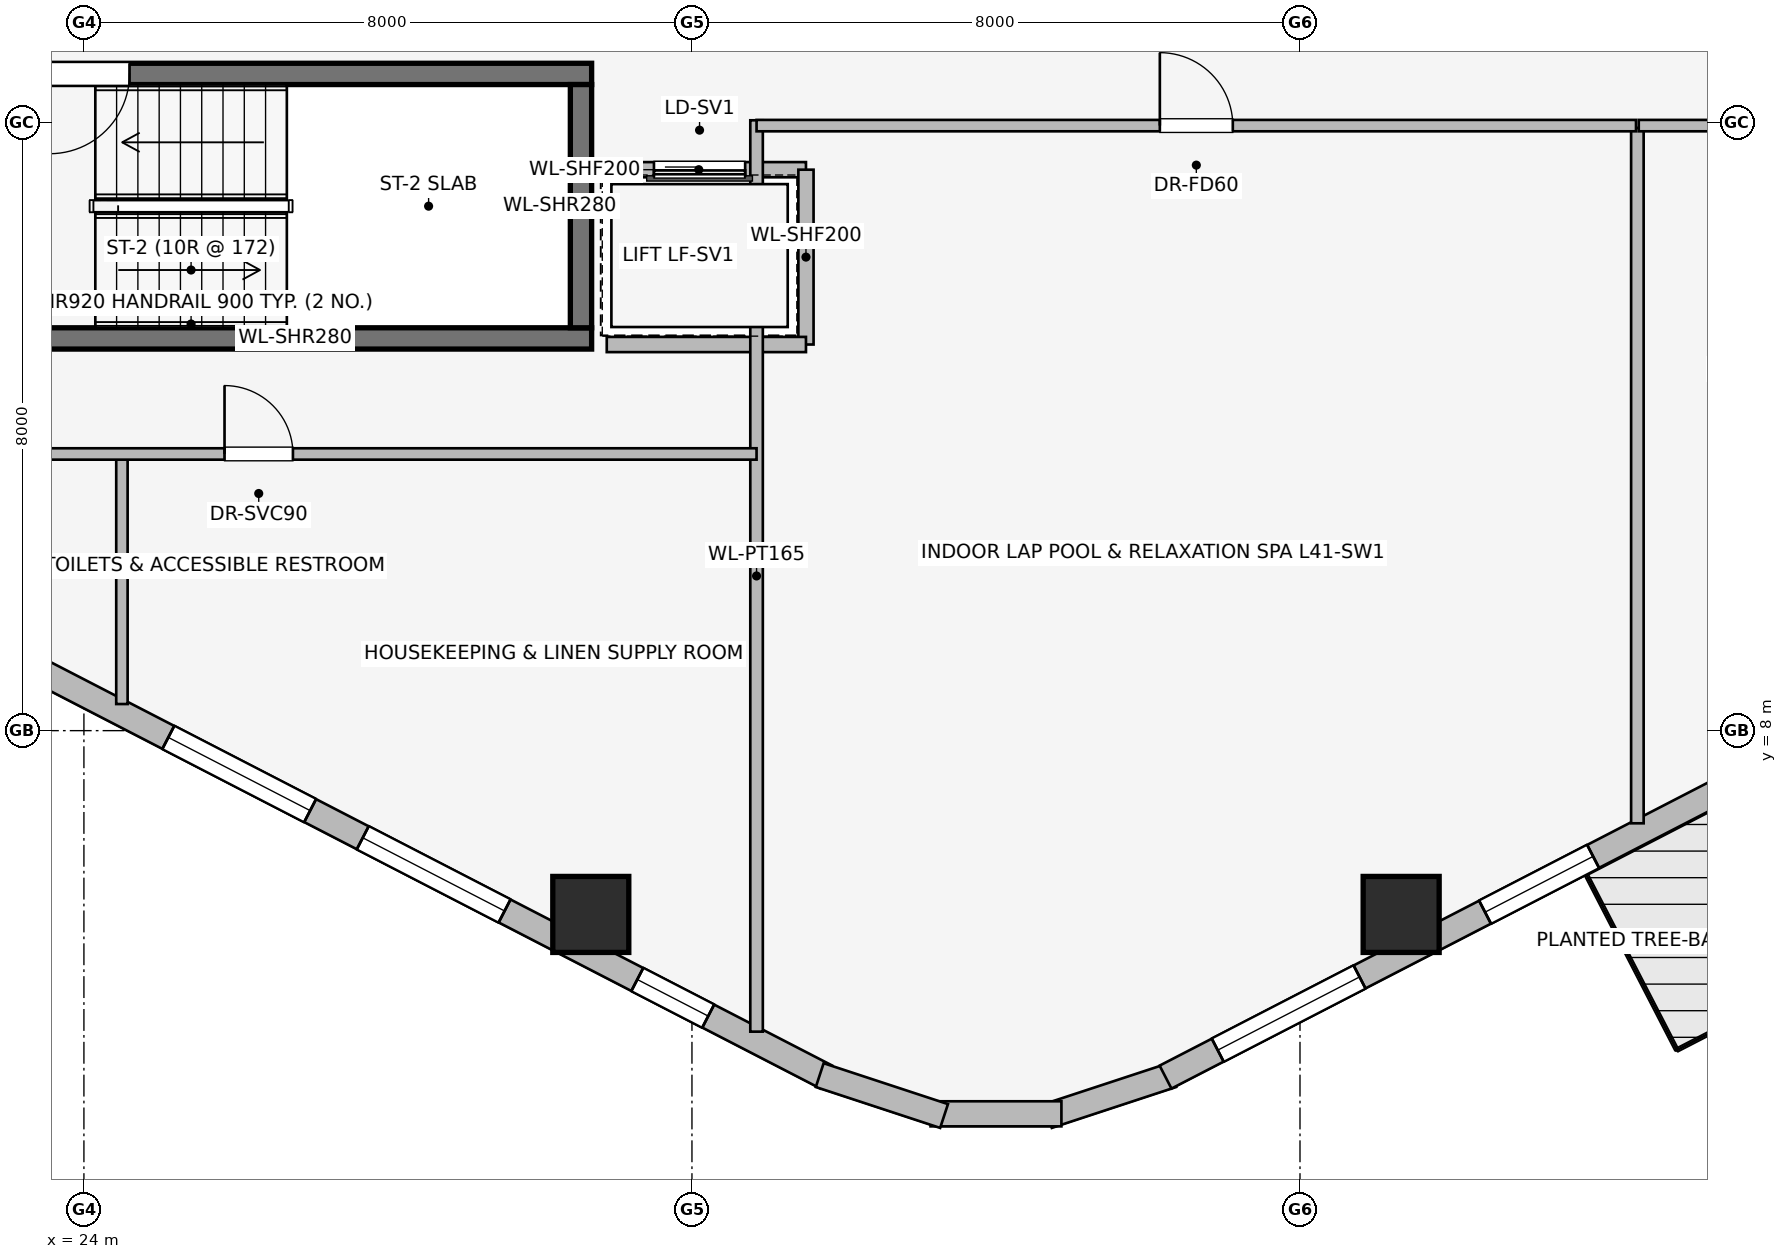
"""IFC4 building model, lengths in metres.
Left out: names, types, materials, properties, quantities, classifications, styles, units other than length and angle.
Written with IfcOpenShell. Run it as: python <this file> out.ifc"""

import sys

from ifc_helpers import new_model, si_unit, direction, frame, frame_2d, origin, origin_2d, place, context, subcontext, project, spatial, rectangle, extrude, element, fill, save


model = new_model("IFC4")
c1 = context("Model", 3, precision=1e-05, world=origin(), true_north=direction((0.0, 1.0)))
c2 = subcontext(c1, "Body", "Model", "MODEL_VIEW")
j1 = project(units=[si_unit("LENGTHUNIT", "METRE"), si_unit("PLANEANGLEUNIT", "RADIAN")], contexts=[c1])
p1 = place(None, origin())
s1 = spatial("IfcSite", under=j1, at=p1, CompositionType="ELEMENT")
p2 = place(p1, origin())
s2 = spatial("IfcBuilding", under=s1, at=p2, CompositionType="ELEMENT")
p3 = place(p2, frame((0.0, 0.0, 153.3)))
s3 = spatial("IfcBuildingStorey", under=s2, at=p3, CompositionType="ELEMENT", Elevation=153.3)
p4 = place(p3, frame((22.32, 13.16, 0.0), z_axis=(0.0, 0.0, 1.0), x_axis=(1.0, 0.0, 0.0)))
e1 = element("IfcWall", 1, at=p4, inside=s3, PredefinedType="SHEAR", context=c2, shape_type="SweptSolid", body=[
    extrude(rectangle(XDim=8.36, YDim=0.28, at=frame_2d((4.18, 0.0))), origin(), (0.0, 0.0, 1.0), 3.45),
])
p5 = place(p3, frame((30.68, 16.64, 0.0), z_axis=(0.0, 0.0, 1.0), x_axis=(-1.0, 0.0, 0.0)))
e2 = element("IfcWall", 2, at=p5, inside=s3, PredefinedType="SHEAR", context=c2, shape_type="SweptSolid", body=[
    extrude(rectangle(XDim=8.36, YDim=0.28, at=frame_2d((4.18, 0.0))), origin(), (0.0, 0.0, 1.0), 3.45),
])
p6 = place(p5, frame((6.08, 0.0, 0.0)))
e3 = element("IfcOpeningElement", 3, at=p6, cuts=e2, PredefinedType="OPENING", context=c2, shape_type="SweptSolid", body=[
    extrude(rectangle(XDim=1.05, YDim=2.0, at=frame_2d((0.525, 1.0))), frame((0.0, 0.15, 0.0), z_axis=(0.0, -1.0, 0.0), x_axis=(1.0, 0.0, 0.0)), (0.0, 0.0, 1.0), 0.3),
])
p7 = place(p3, frame((30.54, 13.3, 0.0), z_axis=(0.0, 0.0, 1.0), x_axis=(0.0, 1.0, 0.0)))
e4 = element("IfcWall", 4, at=p7, inside=s3, PredefinedType="SHEAR", context=c2, shape_type="SweptSolid", body=[
    extrude(rectangle(XDim=3.2, YDim=0.28, at=frame_2d((1.6, 0.0))), origin(), (0.0, 0.0, 1.0), 3.45),
])
for number, where, z_axis, x_axis in (
    (5, (30.669, 5.582, 0.0), (0.0, 0.0, 1.0), (1.0, 0.0, 0.0)),
    (6, (41.331, 5.582, 0.0), (0.0, 0.0, 1.0), (1.0, 0.0, 0.0)),
):
    element("IfcColumn", number, at=place(p3, frame(where, z_axis=z_axis, x_axis=x_axis)), inside=s3, PredefinedType="COLUMN", context=c2, shape_type="SweptSolid", body=[
        extrude(rectangle(XDim=1.0, YDim=1.0, at=origin_2d()), origin(), (0.0, 0.0, 1.0), 3.45),
    ])
p8 = place(p3, frame((33.769, 3.442, 0.0), z_axis=(0.0, 0.0, 1.0), x_axis=(-0.888613612362, 0.458656568606, 0.0)))
e7 = element("IfcWall", 7, at=p8, inside=s3, PredefinedType="STANDARD", context=c2, shape_type="SweptSolid", body=[
    extrude(rectangle(XDim=18.681, YDim=0.34, at=frame_2d((9.34, 0.0))), origin(), (0.0, 0.0, 1.0), 3.19),
])
p9 = place(p8, frame((1.75, 0.0, 0.75)))
e8 = element("IfcOpeningElement", 8, at=p9, cuts=e7, PredefinedType="OPENING", context=c2, shape_type="SweptSolid", body=[
    extrude(rectangle(XDim=1.05, YDim=1.4, at=frame_2d((0.525, 0.7))), frame((0.0, 0.18, 0.0), z_axis=(0.0, -1.0, 0.0), x_axis=(1.0, 0.0, 0.0)), (0.0, 0.0, 1.0), 0.36),
])
p10 = place(p8, frame((4.765, 0.0, 0.75)))
e9 = element("IfcOpeningElement", 9, at=p10, cuts=e7, PredefinedType="OPENING", context=c2, shape_type="SweptSolid", body=[
    extrude(rectangle(XDim=2.1, YDim=1.5, at=frame_2d((1.05, 0.75))), frame((0.0, 0.18, 0.0), z_axis=(0.0, -1.0, 0.0), x_axis=(1.0, 0.0, 0.0)), (0.0, 0.0, 1.0), 0.36),
])
p11 = place(p8, frame((7.644, 0.0, 0.75)))
e10 = element("IfcOpeningElement", 10, at=p11, cuts=e7, PredefinedType="OPENING", context=c2, shape_type="SweptSolid", body=[
    extrude(rectangle(XDim=2.1, YDim=1.5, at=frame_2d((1.05, 0.75))), frame((0.0, 0.18, 0.0), z_axis=(0.0, -1.0, 0.0), x_axis=(1.0, 0.0, 0.0)), (0.0, 0.0, 1.0), 0.36),
])
p12 = place(p8, frame((11.774, 0.0, 0.75)))
e11 = element("IfcOpeningElement", 11, at=p12, cuts=e7, PredefinedType="OPENING", context=c2, shape_type="SweptSolid", body=[
    extrude(rectangle(XDim=1.6, YDim=1.55, at=frame_2d((0.8, 0.775))), frame((0.0, 0.18, 0.0), z_axis=(0.0, -1.0, 0.0), x_axis=(1.0, 0.0, 0.0)), (0.0, 0.0, 1.0), 0.36),
])
p13 = place(p8, frame((15.92, 0.0, 0.75)))
e12 = element("IfcOpeningElement", 12, at=p13, cuts=e7, PredefinedType="OPENING", context=c2, shape_type="SweptSolid", body=[
    extrude(rectangle(XDim=1.05, YDim=1.4, at=frame_2d((0.525, 0.7))), frame((0.0, 0.18, 0.0), z_axis=(0.0, -1.0, 0.0), x_axis=(1.0, 0.0, 0.0)), (0.0, 0.0, 1.0), 0.36),
])
for number, where, z_axis, x_axis in (
    (13, (38.319, 3.468, 0.0), (0.0, 0.0, 1.0), (-0.95, -0.312, 0.0)),
    (14, (36.861, 2.959, 0.0), (0.0, 0.0, 1.0), (-1.0, 0.0, 0.0)),
    (15, (35.317, 2.93, 0.0), (0.0, 0.0, 1.0), (-0.95, 0.312, 0.0)),
):
    element("IfcWall", number, at=place(p3, frame(where, z_axis=z_axis, x_axis=x_axis)), inside=s3, PredefinedType="STANDARD", context=c2, shape_type="SweptSolid", body=[
        extrude(rectangle(XDim=1.722, YDim=0.33, at=frame_2d((0.861, 0.0))), origin(), (0.0, 0.0, 1.0), 3.19),
    ])
p14 = place(p3, frame((54.831, 12.01, 0.0), z_axis=(0.0, 0.0, 1.0), x_axis=(-0.888613612362, -0.458656568606, 0.0)))
e16 = element("IfcWall", 16, at=p14, inside=s3, PredefinedType="STANDARD", context=c2, shape_type="SweptSolid", body=[
    extrude(rectangle(XDim=18.681, YDim=0.34, at=frame_2d((9.34, 0.0))), origin(), (0.0, 0.0, 1.0), 3.19),
])
p15 = place(p14, frame((8.79, 0.0, 0.0)))
e17 = element("IfcOpeningElement", 17, at=p15, cuts=e16, PredefinedType="OPENING", context=c2, shape_type="SweptSolid", body=[
    extrude(rectangle(XDim=1.1, YDim=2.04, at=frame_2d((0.55, 1.02))), frame((0.0, 0.18, 0.0), z_axis=(0.0, -1.0, 0.0), x_axis=(1.0, 0.0, 0.0)), (0.0, 0.0, 1.0), 0.36),
])
p16 = place(p14, frame((1.023, 0.0, 0.75)))
e18 = element("IfcOpeningElement", 18, at=p16, cuts=e16, PredefinedType="OPENING", context=c2, shape_type="SweptSolid", body=[
    extrude(rectangle(XDim=1.6, YDim=1.55, at=frame_2d((0.8, 0.775))), frame((0.0, 0.18, 0.0), z_axis=(0.0, -1.0, 0.0), x_axis=(1.0, 0.0, 0.0)), (0.0, 0.0, 1.0), 0.36),
])
p17 = place(p14, frame((5.373, 0.0, 0.75)))
e19 = element("IfcOpeningElement", 19, at=p17, cuts=e16, PredefinedType="OPENING", context=c2, shape_type="SweptSolid", body=[
    extrude(rectangle(XDim=2.1, YDim=1.5, at=frame_2d((1.05, 0.75))), frame((0.0, 0.18, 0.0), z_axis=(0.0, -1.0, 0.0), x_axis=(1.0, 0.0, 0.0)), (0.0, 0.0, 1.0), 0.36),
])
p18 = place(p14, frame((12.35, 0.0, 0.75)))
e20 = element("IfcOpeningElement", 20, at=p18, cuts=e16, PredefinedType="OPENING", context=c2, shape_type="SweptSolid", body=[
    extrude(rectangle(XDim=1.6, YDim=1.55, at=frame_2d((0.8, 0.775))), frame((0.0, 0.18, 0.0), z_axis=(0.0, -1.0, 0.0), x_axis=(1.0, 0.0, 0.0)), (0.0, 0.0, 1.0), 0.36),
])
p19 = place(p14, frame((15.808, 0.0, 0.75)))
e21 = element("IfcOpeningElement", 21, at=p19, cuts=e16, PredefinedType="OPENING", context=c2, shape_type="SweptSolid", body=[
    extrude(rectangle(XDim=2.1, YDim=1.5, at=frame_2d((1.05, 0.75))), frame((0.0, 0.18, 0.0), z_axis=(0.0, -1.0, 0.0), x_axis=(1.0, 0.0, 0.0)), (0.0, 0.0, 1.0), 0.36),
])
p20 = place(p3, frame((33.5, 15.38, 0.0), z_axis=(0.0, 0.0, 1.0), x_axis=(-1.0, 0.0, 0.0)))
e22 = element("IfcWall", 22, at=p20, inside=s3, PredefinedType="PARTITIONING", context=c2, shape_type="SweptSolid", body=[
    extrude(rectangle(XDim=2.82, YDim=0.2, at=frame_2d((1.41, 0.0))), origin(), (0.0, 0.0, 1.0), 3.19),
])
p21 = place(p20, frame((0.8, 0.0, 0.0)))
e23 = element("IfcOpeningElement", 23, at=p21, cuts=e22, PredefinedType="OPENING", context=c2, shape_type="SweptSolid", body=[
    extrude(rectangle(XDim=1.2, YDim=2.2, at=frame_2d((0.6, 1.1))), frame((0.0, 0.11, 0.0), z_axis=(0.0, -1.0, 0.0), x_axis=(1.0, 0.0, 0.0)), (0.0, 0.0, 1.0), 0.22),
])
p22 = place(p3, frame((33.5, 13.08, 0.0), z_axis=(0.0, 0.0, 1.0), x_axis=(0.0, 1.0, 0.0)))
e24 = element("IfcWall", 24, at=p22, inside=s3, PredefinedType="PARTITIONING", context=c2, shape_type="SweptSolid", body=[
    extrude(rectangle(XDim=2.3, YDim=0.2, at=frame_2d((1.15, 0.0))), origin(), (0.0, 0.0, 1.0), 3.19),
])
p23 = place(p3, frame((30.879, 13.08, 0.0), z_axis=(0.0, 0.0, 1.0), x_axis=(1.0, 0.0, 0.0)))
e25 = element("IfcWall", 25, at=p23, inside=s3, PredefinedType="PARTITIONING", context=c2, shape_type="SweptSolid", body=[
    extrude(rectangle(XDim=2.621, YDim=0.2, at=frame_2d((1.311, 0.0))), origin(), (0.0, 0.0, 1.0), 3.19),
])
p24 = place(p3, frame((32.85, 4.04, 0.0), z_axis=(0.0, 0.0, 1.0), x_axis=(0.0, 1.0, 0.0)))
e26 = element("IfcWall", 26, at=p24, inside=s3, PredefinedType="PARTITIONING", context=c2, shape_type="SweptSolid", body=[
    extrude(rectangle(XDim=11.99, YDim=0.165, at=frame_2d((5.995, 0.0))), origin(), (0.0, 0.0, 1.0), 3.19),
])
p25 = place(p3, frame((24.5, 8.35, 0.0), z_axis=(0.0, 0.0, 1.0), x_axis=(0.0, 1.0, 0.0)))
e27 = element("IfcWall", 27, at=p25, inside=s3, PredefinedType="PARTITIONING", context=c2, shape_type="SweptSolid", body=[
    extrude(rectangle(XDim=3.29, YDim=0.15, at=frame_2d((1.645, 0.0))), origin(), (0.0, 0.0, 1.0), 3.19),
])
p26 = place(p3, frame((18.126, 11.64, 0.0), z_axis=(0.0, 0.0, 1.0), x_axis=(1.0, 0.0, 0.0)))
e28 = element("IfcWall", 28, at=p26, inside=s3, PredefinedType="PARTITIONING", context=c2, shape_type="SweptSolid", body=[
    extrude(rectangle(XDim=14.724, YDim=0.15, at=frame_2d((7.362, 0.0))), origin(), (0.0, 0.0, 1.0), 3.19),
])
p27 = place(p26, frame((4.274, 0.0, 0.0)))
e29 = element("IfcOpeningElement", 29, at=p27, cuts=e28, PredefinedType="OPENING", context=c2, shape_type="SweptSolid", body=[
    extrude(rectangle(XDim=0.9, YDim=2.0, at=frame_2d((0.45, 1.0))), frame((0.0, 0.085, 0.0), z_axis=(0.0, -1.0, 0.0), x_axis=(1.0, 0.0, 0.0)), (0.0, 0.0, 1.0), 0.17),
])
p28 = place(p26, frame((7.724, 0.0, 0.0)))
e30 = element("IfcOpeningElement", 30, at=p28, cuts=e28, PredefinedType="OPENING", context=c2, shape_type="SweptSolid", body=[
    extrude(rectangle(XDim=0.9, YDim=2.0, at=frame_2d((0.45, 1.0))), frame((0.0, 0.085, 0.0), z_axis=(0.0, -1.0, 0.0), x_axis=(1.0, 0.0, 0.0)), (0.0, 0.0, 1.0), 0.17),
])
p29 = place(p3, frame((44.439, 6.781, 0.0), z_axis=(0.0, 0.0, 1.0), x_axis=(0.0, 1.0, 0.0)))
e31 = element("IfcWall", 31, at=p29, inside=s3, PredefinedType="PARTITIONING", context=c2, shape_type="SweptSolid", body=[
    extrude(rectangle(XDim=9.149, YDim=0.165, at=frame_2d((4.574, 0.0))), origin(), (0.0, 0.0, 1.0), 3.19),
])
p30 = place(p3, frame((32.85, 15.96, 0.0), z_axis=(0.0, 0.0, 1.0), x_axis=(1.0, 0.0, 0.0)))
e32 = element("IfcWall", 32, at=p30, inside=s3, PredefinedType="PARTITIONING", context=c2, shape_type="SweptSolid", body=[
    extrude(rectangle(XDim=11.571, YDim=0.15, at=frame_2d((5.785, 0.0))), origin(), (0.0, 0.0, 1.0), 3.19),
])
p31 = place(p30, frame((5.306, 0.0, 0.0)))
e33 = element("IfcOpeningElement", 33, at=p31, cuts=e32, PredefinedType="OPENING", context=c2, shape_type="SweptSolid", body=[
    extrude(rectangle(XDim=0.96, YDim=2.0, at=frame_2d((0.48, 1.0))), frame((0.0, 0.085, 0.0), z_axis=(0.0, -1.0, 0.0), x_axis=(1.0, 0.0, 0.0)), (0.0, 0.0, 1.0), 0.17),
])
p32 = place(p3, frame((44.457, 15.96, 0.0), z_axis=(0.0, 0.0, 1.0), x_axis=(1.0, 0.0, 0.0)))
e34 = element("IfcWall", 34, at=p32, inside=s3, PredefinedType="PARTITIONING", context=c2, shape_type="SweptSolid", body=[
    extrude(rectangle(XDim=12.751, YDim=0.15, at=frame_2d((6.375, 0.0))), origin(), (0.0, 0.0, 1.0), 3.19),
])
p33 = place(p32, frame((5.909, 0.0, 0.0)))
e35 = element("IfcOpeningElement", 35, at=p33, cuts=e34, PredefinedType="OPENING", context=c2, shape_type="SweptSolid", body=[
    extrude(rectangle(XDim=0.96, YDim=2.0, at=frame_2d((0.48, 1.0))), frame((0.0, 0.085, 0.0), z_axis=(0.0, -1.0, 0.0), x_axis=(1.0, 0.0, 0.0)), (0.0, 0.0, 1.0), 0.17),
])
p34 = place(p9, origin())
e36 = element("IfcWindow", 36, at=p34, inside=s3, PartitioningType="SINGLE_PANEL", PredefinedType="WINDOW", context=c2, shape_type="SweptSolid", body=[
    extrude(rectangle(XDim=1.05, YDim=1.4, at=frame_2d((0.525, 0.7))), frame((0.0, 0.03, 0.0), z_axis=(0.0, -1.0, 0.0), x_axis=(1.0, 0.0, 0.0)), (0.0, 0.0, 1.0), 0.06),
])
fill(e8, e36)
p35 = place(p10, origin())
e37 = element("IfcWindow", 37, at=p35, inside=s3, PartitioningType="SINGLE_PANEL", PredefinedType="WINDOW", context=c2, shape_type="SweptSolid", body=[
    extrude(rectangle(XDim=2.1, YDim=1.5, at=frame_2d((1.05, 0.75))), frame((0.0, 0.03, 0.0), z_axis=(0.0, -1.0, 0.0), x_axis=(1.0, 0.0, 0.0)), (0.0, 0.0, 1.0), 0.06),
])
fill(e9, e37)
p36 = place(p11, origin())
e38 = element("IfcWindow", 38, at=p36, inside=s3, PartitioningType="SINGLE_PANEL", PredefinedType="WINDOW", context=c2, shape_type="SweptSolid", body=[
    extrude(rectangle(XDim=2.1, YDim=1.5, at=frame_2d((1.05, 0.75))), frame((0.0, 0.03, 0.0), z_axis=(0.0, -1.0, 0.0), x_axis=(1.0, 0.0, 0.0)), (0.0, 0.0, 1.0), 0.06),
])
fill(e10, e38)
p37 = place(p18, origin())
e39 = element("IfcWindow", 39, at=p37, inside=s3, PartitioningType="SINGLE_PANEL", PredefinedType="WINDOW", context=c2, shape_type="SweptSolid", body=[
    extrude(rectangle(XDim=1.6, YDim=1.55, at=frame_2d((0.8, 0.775))), frame((0.0, 0.03, 0.0), z_axis=(0.0, -1.0, 0.0), x_axis=(1.0, 0.0, 0.0)), (0.0, 0.0, 1.0), 0.06),
])
fill(e20, e39)
p38 = place(p19, origin())
e40 = element("IfcWindow", 40, at=p38, inside=s3, PartitioningType="SINGLE_PANEL", PredefinedType="WINDOW", context=c2, shape_type="SweptSolid", body=[
    extrude(rectangle(XDim=2.1, YDim=1.5, at=frame_2d((1.05, 0.75))), frame((0.0, 0.03, 0.0), z_axis=(0.0, -1.0, 0.0), x_axis=(1.0, 0.0, 0.0)), (0.0, 0.0, 1.0), 0.06),
])
fill(e21, e40)
p39 = place(p6, origin())
e41 = element("IfcDoor", 41, at=p39, inside=s3, OperationType="SINGLE_SWING_RIGHT", PredefinedType="DOOR", context=c2, shape_type="SweptSolid", body=[
    extrude(rectangle(XDim=1.05, YDim=2.0, at=frame_2d((0.525, 1.0))), frame((0.0, 0.025, 0.0), z_axis=(0.0, -1.0, 0.0), x_axis=(1.0, 0.0, 0.0)), (0.0, 0.0, 1.0), 0.05),
])
fill(e3, e41)
p40 = place(p21, origin())
e42 = element("IfcDoor", 42, at=p40, inside=s3, OperationType="SLIDING_TO_RIGHT", PredefinedType="DOOR", context=c2, shape_type="SweptSolid", body=[
    extrude(rectangle(XDim=1.2, YDim=2.2, at=frame_2d((0.6, 1.1))), frame((0.0, 0.025, 0.0), z_axis=(0.0, -1.0, 0.0), x_axis=(1.0, 0.0, 0.0)), (0.0, 0.0, 1.0), 0.05),
])
fill(e23, e42)
p41 = place(p28, origin())
e43 = element("IfcDoor", 43, at=p41, inside=s3, OperationType="SINGLE_SWING_LEFT", PredefinedType="DOOR", context=c2, shape_type="SweptSolid", body=[
    extrude(rectangle(XDim=0.9, YDim=2.0, at=frame_2d((0.45, 1.0))), frame((0.0, 0.025, 0.0), z_axis=(0.0, -1.0, 0.0), x_axis=(1.0, 0.0, 0.0)), (0.0, 0.0, 1.0), 0.05),
])
fill(e30, e43)
p42 = place(p31, origin())
e44 = element("IfcDoor", 44, at=p42, inside=s3, OperationType="SINGLE_SWING_LEFT", PredefinedType="DOOR", context=c2, shape_type="SweptSolid", body=[
    extrude(rectangle(XDim=0.96, YDim=2.0, at=frame_2d((0.48, 1.0))), frame((0.0, 0.025, 0.0), z_axis=(0.0, -1.0, 0.0), x_axis=(1.0, 0.0, 0.0)), (0.0, 0.0, 1.0), 0.05),
])
fill(e33, e44)
save(model, sys.argv[1])
